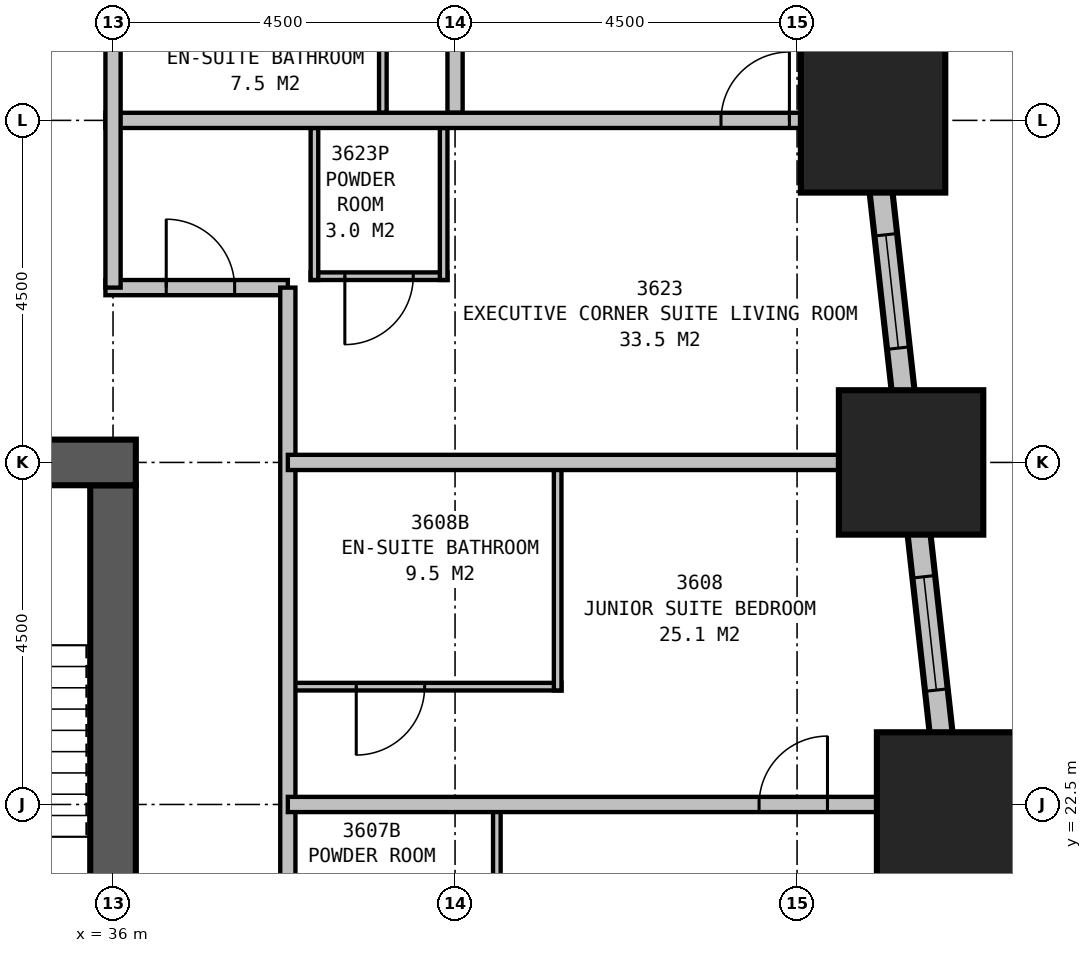
"""IFC4 building model, lengths in metres.
Left out: names, types, materials, properties, quantities, classifications, styles, units other than length and angle.
Written with IfcOpenShell. Run it as: python <this file> out.ifc"""

import sys

from ifc_helpers import new_model, si_unit, direction, frame, frame_2d, origin, origin_2d, place, context, subcontext, project, spatial, rectangle, extrude, element, fill, save


model = new_model("IFC4")
c1 = context("Model", 3, precision=1e-05, world=origin(), true_north=direction((0.0, 1.0)))
c2 = subcontext(c1, "Body", "Model", "MODEL_VIEW")
j1 = project(units=[si_unit("LENGTHUNIT", "METRE"), si_unit("PLANEANGLEUNIT", "RADIAN")], contexts=[c1])
p1 = place(None, origin())
s1 = spatial("IfcSite", under=j1, at=p1, CompositionType="ELEMENT")
p2 = place(p1, origin())
s2 = spatial("IfcBuilding", under=s1, at=p2, CompositionType="ELEMENT")
p3 = place(p2, frame((0.0, 0.0, 138.9)))
s3 = spatial("IfcBuildingStorey", under=s2, at=p3, CompositionType="ELEMENT", Elevation=138.9)
for number, where, z_axis, x_axis in (
    (1, (47.0, 22.5, 0.0), (0.0, 0.0, 1.0), (1.0, 0.0, 0.0)),
    (2, (46.5, 27.0, 0.0), (0.0, 0.0, 1.0), (1.0, 0.0, 0.0)),
    (3, (46.0, 31.5, 0.0), (0.0, 0.0, 1.0), (1.0, 0.0, 0.0)),
):
    element("IfcColumn", number, at=place(p3, frame(where, z_axis=z_axis, x_axis=x_axis)), inside=s3, PredefinedType="COLUMN", context=c2, shape_type="SweptSolid", body=[
        extrude(rectangle(XDim=1.9, YDim=1.9, at=origin_2d()), origin(), (0.0, 0.0, 1.0), 3.5),
    ])
p4 = place(p3, frame((36.3, 27.0, 0.0), z_axis=(0.0, 0.0, 1.0), x_axis=(-1.0, 0.0, 0.0)))
e4 = element("IfcWall", 4, at=p4, inside=s3, PredefinedType="SHEAR", context=c2, shape_type="SweptSolid", body=[
    extrude(rectangle(XDim=23.1, YDim=0.6, at=frame_2d((11.55, 0.0))), origin(), (0.0, 0.0, 1.0), 3.5),
])
p5 = place(p4, frame((17.05, 0.0, 0.0)))
e5 = element("IfcOpeningElement", 5, at=p5, cuts=e4, PredefinedType="OPENING", context=c2, shape_type="SweptSolid", body=[
    extrude(rectangle(XDim=1.0, YDim=2.1, at=frame_2d((0.5, 1.05))), frame((0.0, 0.31, 0.0), z_axis=(0.0, -1.0, 0.0), x_axis=(1.0, 0.0, 0.0)), (0.0, 0.0, 1.0), 0.62),
])
p6 = place(p4, frame((12.05, 0.0, 0.0)))
e6 = element("IfcOpeningElement", 6, at=p6, cuts=e4, PredefinedType="OPENING", context=c2, shape_type="SweptSolid", body=[
    extrude(rectangle(XDim=1.0, YDim=2.1, at=frame_2d((0.5, 1.05))), frame((0.0, 0.31, 0.0), z_axis=(0.0, -1.0, 0.0), x_axis=(1.0, 0.0, 0.0)), (0.0, 0.0, 1.0), 0.62),
])
p7 = place(p4, frame((7.05, 0.0, 0.0)))
e7 = element("IfcOpeningElement", 7, at=p7, cuts=e4, PredefinedType="OPENING", context=c2, shape_type="SweptSolid", body=[
    extrude(rectangle(XDim=1.0, YDim=2.1, at=frame_2d((0.5, 1.05))), frame((0.0, 0.31, 0.0), z_axis=(0.0, -1.0, 0.0), x_axis=(1.0, 0.0, 0.0)), (0.0, 0.0, 1.0), 0.62),
])
p8 = place(p3, frame((36.0, 20.0, 0.0), z_axis=(0.0, 0.0, 1.0), x_axis=(0.0, 1.0, 0.0)))
e8 = element("IfcWall", 8, at=p8, inside=s3, PredefinedType="SHEAR", context=c2, shape_type="SweptSolid", body=[
    extrude(rectangle(XDim=6.7, YDim=0.6, at=frame_2d((3.35, 0.0))), origin(), (0.0, 0.0, 1.0), 3.5),
])
p9 = place(p3, frame((49.017, 4.351, 0.0), z_axis=(0.0, 0.0, 1.0), x_axis=(-0.110433201132, 0.993883548555, 0.0)))
e9 = element("IfcWall", 9, at=p9, inside=s3, PredefinedType="STANDARD", context=c2, shape_type="SweptSolid", body=[
    extrude(rectangle(XDim=31.994, YDim=0.3, at=frame_2d((15.997, 0.0))), origin(), (0.0, 0.0, 1.0), 2.15),
])
p10 = place(p9, frame((1.664, 0.0, 0.5)))
e10 = element("IfcOpeningElement", 10, at=p10, cuts=e9, PredefinedType="OPENING", context=c2, shape_type="SweptSolid", body=[
    extrude(rectangle(XDim=1.5, YDim=1.5, at=frame_2d((0.75, 0.75))), frame((0.0, 0.16, 0.0), z_axis=(0.0, -1.0, 0.0), x_axis=(1.0, 0.0, 0.0)), (0.0, 0.0, 1.0), 0.32),
])
p11 = place(p9, frame((6.192, 0.0, 0.5)))
e11 = element("IfcOpeningElement", 11, at=p11, cuts=e9, PredefinedType="OPENING", context=c2, shape_type="SweptSolid", body=[
    extrude(rectangle(XDim=1.5, YDim=1.5, at=frame_2d((0.75, 0.75))), frame((0.0, 0.16, 0.0), z_axis=(0.0, -1.0, 0.0), x_axis=(1.0, 0.0, 0.0)), (0.0, 0.0, 1.0), 0.32),
])
p12 = place(p9, frame((10.719, 0.0, 0.5)))
e12 = element("IfcOpeningElement", 12, at=p12, cuts=e9, PredefinedType="OPENING", context=c2, shape_type="SweptSolid", body=[
    extrude(rectangle(XDim=1.5, YDim=1.5, at=frame_2d((0.75, 0.75))), frame((0.0, 0.16, 0.0), z_axis=(0.0, -1.0, 0.0), x_axis=(1.0, 0.0, 0.0)), (0.0, 0.0, 1.0), 0.32),
])
p13 = place(p9, frame((15.247, 0.0, 0.5)))
e13 = element("IfcOpeningElement", 13, at=p13, cuts=e9, PredefinedType="OPENING", context=c2, shape_type="SweptSolid", body=[
    extrude(rectangle(XDim=1.5, YDim=1.5, at=frame_2d((0.75, 0.75))), frame((0.0, 0.16, 0.0), z_axis=(0.0, -1.0, 0.0), x_axis=(1.0, 0.0, 0.0)), (0.0, 0.0, 1.0), 0.32),
])
p14 = place(p9, frame((19.775, 0.0, 0.5)))
e14 = element("IfcOpeningElement", 14, at=p14, cuts=e9, PredefinedType="OPENING", context=c2, shape_type="SweptSolid", body=[
    extrude(rectangle(XDim=1.5, YDim=1.5, at=frame_2d((0.75, 0.75))), frame((0.0, 0.16, 0.0), z_axis=(0.0, -1.0, 0.0), x_axis=(1.0, 0.0, 0.0)), (0.0, 0.0, 1.0), 0.32),
])
p15 = place(p9, frame((24.302, 0.0, 0.5)))
e15 = element("IfcOpeningElement", 15, at=p15, cuts=e9, PredefinedType="OPENING", context=c2, shape_type="SweptSolid", body=[
    extrude(rectangle(XDim=1.5, YDim=1.5, at=frame_2d((0.75, 0.75))), frame((0.0, 0.16, 0.0), z_axis=(0.0, -1.0, 0.0), x_axis=(1.0, 0.0, 0.0)), (0.0, 0.0, 1.0), 0.32),
])
p16 = place(p9, frame((28.83, 0.0, 0.5)))
e16 = element("IfcOpeningElement", 16, at=p16, cuts=e9, PredefinedType="OPENING", context=c2, shape_type="SweptSolid", body=[
    extrude(rectangle(XDim=1.5, YDim=1.5, at=frame_2d((0.75, 0.75))), frame((0.0, 0.16, 0.0), z_axis=(0.0, -1.0, 0.0), x_axis=(1.0, 0.0, 0.0)), (0.0, 0.0, 1.0), 0.32),
])
p17 = place(p3, frame((35.9, 29.3, 0.0), z_axis=(0.0, 0.0, 1.0), x_axis=(1.0, 0.0, 0.0)))
e17 = element("IfcWall", 17, at=p17, inside=s3, PredefinedType="PARTITIONING", context=c2, shape_type="SweptSolid", body=[
    extrude(rectangle(XDim=2.4, YDim=0.2, at=frame_2d((1.2, 0.0))), origin(), (0.0, 0.0, 1.0), 3.25),
])
p18 = place(p17, frame((0.8, 0.0, 0.0)))
e18 = element("IfcOpeningElement", 18, at=p18, cuts=e17, PredefinedType="OPENING", context=c2, shape_type="SweptSolid", body=[
    extrude(rectangle(XDim=0.9, YDim=2.1, at=frame_2d((0.45, 1.05))), frame((0.0, 0.11, 0.0), z_axis=(0.0, -1.0, 0.0), x_axis=(1.0, 0.0, 0.0)), (0.0, 0.0, 1.0), 0.22),
])
p19 = place(p3, frame((38.3, 11.2, 0.0), z_axis=(0.0, 0.0, 1.0), x_axis=(0.0, 1.0, 0.0)))
e19 = element("IfcWall", 19, at=p19, inside=s3, PredefinedType="PARTITIONING", context=c2, shape_type="SweptSolid", body=[
    extrude(rectangle(XDim=18.1, YDim=0.2, at=frame_2d((9.05, 0.0))), origin(), (0.0, 0.0, 1.0), 3.25),
])
p20 = place(p19, frame((5.0, 0.0, 0.0), z_axis=(0.0, 0.0, 1.0), x_axis=(-1.0, 0.0, 0.0)))
e20 = element("IfcOpeningElement", 20, at=p20, cuts=e19, PredefinedType="OPENING", context=c2, shape_type="SweptSolid", body=[
    extrude(rectangle(XDim=1.0, YDim=2.1, at=frame_2d((0.5, 1.05))), frame((0.0, 0.11, 0.0), z_axis=(0.0, -1.0, 0.0), x_axis=(1.0, 0.0, 0.0)), (0.0, 0.0, 1.0), 0.22),
])
p21 = place(p19, frame((8.55, 0.0, 0.0), z_axis=(0.0, 0.0, 1.0), x_axis=(-1.0, 0.0, 0.0)))
e21 = element("IfcOpeningElement", 21, at=p21, cuts=e19, PredefinedType="OPENING", context=c2, shape_type="SweptSolid", body=[
    extrude(rectangle(XDim=0.9, YDim=2.1, at=frame_2d((0.45, 1.05))), frame((0.0, 0.11, 0.0), z_axis=(0.0, -1.0, 0.0), x_axis=(1.0, 0.0, 0.0)), (0.0, 0.0, 1.0), 0.22),
])
p22 = place(p3, frame((38.3, 22.5, 0.0), z_axis=(0.0, 0.0, 1.0), x_axis=(1.0, 0.0, 0.0)))
e22 = element("IfcWall", 22, at=p22, inside=s3, PredefinedType="PARTITIONING", context=c2, shape_type="SweptSolid", body=[
    extrude(rectangle(XDim=8.699, YDim=0.2, at=frame_2d((4.35, 0.0))), origin(), (0.0, 0.0, 1.0), 2.25),
])
p23 = place(p22, frame((6.2, 0.0, 0.0)))
e23 = element("IfcOpeningElement", 23, at=p23, cuts=e22, PredefinedType="OPENING", context=c2, shape_type="SweptSolid", body=[
    extrude(rectangle(XDim=0.9, YDim=2.1, at=frame_2d((0.45, 1.05))), frame((0.0, 0.11, 0.0), z_axis=(0.0, -1.0, 0.0), x_axis=(1.0, 0.0, 0.0)), (0.0, 0.0, 1.0), 0.22),
])
p24 = place(p3, frame((41.05, 20.1, 0.0), z_axis=(0.0, 0.0, 1.0), x_axis=(0.0, 1.0, 0.0)))
e24 = element("IfcWall", 24, at=p24, inside=s3, PredefinedType="PLUMBINGWALL", context=c2, shape_type="SweptSolid", body=[
    extrude(rectangle(XDim=2.4, YDim=0.1, at=frame_2d((1.2, 0.0))), origin(), (0.0, 0.0, 1.0), 3.25),
])
p25 = place(p3, frame((41.85, 24.0, 0.0), z_axis=(0.0, 0.0, 1.0), x_axis=(0.0, 1.0, 0.0)))
e25 = element("IfcWall", 25, at=p25, inside=s3, PredefinedType="PLUMBINGWALL", context=c2, shape_type="SweptSolid", body=[
    extrude(rectangle(XDim=3.0, YDim=0.1, at=frame_2d((1.5, 0.0))), origin(), (0.0, 0.0, 1.0), 3.25),
])
p26 = place(p3, frame((38.3, 24.05, 0.0), z_axis=(0.0, 0.0, 1.0), x_axis=(1.0, 0.0, 0.0)))
e26 = element("IfcWall", 26, at=p26, inside=s3, PredefinedType="PLUMBINGWALL", context=c2, shape_type="SweptSolid", body=[
    extrude(rectangle(XDim=3.6, YDim=0.1, at=frame_2d((1.8, 0.0))), origin(), (0.0, 0.0, 1.0), 3.25),
])
p27 = place(p26, frame((1.8, 0.0, 0.0), z_axis=(0.0, 0.0, 1.0), x_axis=(-1.0, 0.0, 0.0)))
e27 = element("IfcOpeningElement", 27, at=p27, cuts=e26, PredefinedType="OPENING", context=c2, shape_type="SweptSolid", body=[
    extrude(rectangle(XDim=0.9, YDim=2.1, at=frame_2d((0.45, 1.05))), frame((0.0, 0.06, 0.0), z_axis=(0.0, -1.0, 0.0), x_axis=(1.0, 0.0, 0.0)), (0.0, 0.0, 1.0), 0.12),
])
p28 = place(p3, frame((38.3, 27.0, 0.0), z_axis=(0.0, 0.0, 1.0), x_axis=(1.0, 0.0, 0.0)))
e28 = element("IfcWall", 28, at=p28, inside=s3, PredefinedType="PARTITIONING", context=c2, shape_type="SweptSolid", body=[
    extrude(rectangle(XDim=7.977, YDim=0.2, at=frame_2d((3.988, 0.0))), origin(), (0.0, 0.0, 1.0), 1.95),
])
p29 = place(p3, frame((36.0, 29.3, 0.0), z_axis=(0.0, 0.0, 1.0), x_axis=(0.0, 1.0, 0.0)))
e29 = element("IfcWall", 29, at=p29, inside=s3, PredefinedType="PARTITIONING", context=c2, shape_type="SweptSolid", body=[
    extrude(rectangle(XDim=11.2, YDim=0.2, at=frame_2d((5.6, 0.0))), origin(), (0.0, 0.0, 1.0), 2.25),
])
p30 = place(p3, frame((35.9, 31.5, 0.0), z_axis=(0.0, 0.0, 1.0), x_axis=(1.0, 0.0, 0.0)))
e30 = element("IfcWall", 30, at=p30, inside=s3, PredefinedType="PARTITIONING", context=c2, shape_type="SweptSolid", body=[
    extrude(rectangle(XDim=10.099, YDim=0.2, at=frame_2d((5.05, 0.0))), origin(), (0.0, 0.0, 1.0), 3.25),
])
p31 = place(p30, frame((8.099, 0.0, 0.0)))
e31 = element("IfcOpeningElement", 31, at=p31, cuts=e30, PredefinedType="OPENING", context=c2, shape_type="SweptSolid", body=[
    extrude(rectangle(XDim=0.9, YDim=2.1, at=frame_2d((0.45, 1.05))), frame((0.0, 0.11, 0.0), z_axis=(0.0, -1.0, 0.0), x_axis=(1.0, 0.0, 0.0)), (0.0, 0.0, 1.0), 0.22),
])
p32 = place(p3, frame((40.35, 31.4, 0.0), z_axis=(0.0, 0.0, 1.0), x_axis=(0.0, -1.0, 0.0)))
e32 = element("IfcWall", 32, at=p32, inside=s3, PredefinedType="PLUMBINGWALL", context=c2, shape_type="SweptSolid", body=[
    extrude(rectangle(XDim=2.0, YDim=0.1, at=frame_2d((1.0, 0.0))), origin(), (0.0, 0.0, 1.0), 2.25),
])
p33 = place(p3, frame((38.65, 31.4, 0.0), z_axis=(0.0, 0.0, 1.0), x_axis=(0.0, -1.0, 0.0)))
e33 = element("IfcWall", 33, at=p33, inside=s3, PredefinedType="PLUMBINGWALL", context=c2, shape_type="SweptSolid", body=[
    extrude(rectangle(XDim=2.0, YDim=0.1, at=frame_2d((1.0, 0.0))), origin(), (0.0, 0.0, 1.0), 3.25),
])
p34 = place(p3, frame((38.6, 29.45, 0.0), z_axis=(0.0, 0.0, 1.0), x_axis=(1.0, 0.0, 0.0)))
e34 = element("IfcWall", 34, at=p34, inside=s3, PredefinedType="PLUMBINGWALL", context=c2, shape_type="SweptSolid", body=[
    extrude(rectangle(XDim=1.8, YDim=0.1, at=frame_2d((0.9, 0.0))), origin(), (0.0, 0.0, 1.0), 3.25),
])
p35 = place(p34, frame((1.35, 0.0, 0.0), z_axis=(0.0, 0.0, 1.0), x_axis=(-1.0, 0.0, 0.0)))
e35 = element("IfcOpeningElement", 35, at=p35, cuts=e34, PredefinedType="OPENING", context=c2, shape_type="SweptSolid", body=[
    extrude(rectangle(XDim=0.9, YDim=2.1, at=frame_2d((0.45, 1.05))), frame((0.0, 0.06, 0.0), z_axis=(0.0, -1.0, 0.0), x_axis=(1.0, 0.0, 0.0)), (0.0, 0.0, 1.0), 0.12),
])
p36 = place(p3, frame((40.5, 31.6, 0.0), z_axis=(0.0, 0.0, 1.0), x_axis=(0.0, 1.0, 0.0)))
e36 = element("IfcWall", 36, at=p36, inside=s3, PredefinedType="PARTITIONING", context=c2, shape_type="SweptSolid", body=[
    extrude(rectangle(XDim=4.4, YDim=0.2, at=frame_2d((2.2, 0.0))), origin(), (0.0, 0.0, 1.0), 2.25),
])
p37 = place(p36, frame((2.4, 0.0, 0.0)))
e37 = element("IfcOpeningElement", 37, at=p37, cuts=e36, PredefinedType="OPENING", context=c2, shape_type="SweptSolid", body=[
    extrude(rectangle(XDim=0.9, YDim=2.1, at=frame_2d((0.45, 1.05))), frame((0.0, 0.11, 0.0), z_axis=(0.0, -1.0, 0.0), x_axis=(1.0, 0.0, 0.0)), (0.0, 0.0, 1.0), 0.22),
])
p38 = place(p3, frame((39.55, 31.6, 0.0), z_axis=(0.0, 0.0, 1.0), x_axis=(0.0, 1.0, 0.0)))
e38 = element("IfcWall", 38, at=p38, inside=s3, PredefinedType="PLUMBINGWALL", context=c2, shape_type="SweptSolid", body=[
    extrude(rectangle(XDim=2.3, YDim=0.1, at=frame_2d((1.15, 0.0))), origin(), (0.0, 0.0, 1.0), 3.25),
])
p39 = place(p14, origin())
e39 = element("IfcWindow", 39, at=p39, inside=s3, PartitioningType="SINGLE_PANEL", PredefinedType="WINDOW", context=c2, shape_type="SweptSolid", body=[
    extrude(rectangle(XDim=1.5, YDim=1.5, at=frame_2d((0.75, 0.75))), frame((0.0, 0.03, 0.0), z_axis=(0.0, -1.0, 0.0), x_axis=(1.0, 0.0, 0.0)), (0.0, 0.0, 1.0), 0.06),
])
fill(e14, e39)
p40 = place(p15, origin())
e40 = element("IfcWindow", 40, at=p40, inside=s3, PartitioningType="SINGLE_PANEL", PredefinedType="WINDOW", context=c2, shape_type="SweptSolid", body=[
    extrude(rectangle(XDim=1.5, YDim=1.5, at=frame_2d((0.75, 0.75))), frame((0.0, 0.03, 0.0), z_axis=(0.0, -1.0, 0.0), x_axis=(1.0, 0.0, 0.0)), (0.0, 0.0, 1.0), 0.06),
])
fill(e15, e40)
p41 = place(p18, origin())
e41 = element("IfcDoor", 41, at=p41, inside=s3, OperationType="SINGLE_SWING_LEFT", PredefinedType="DOOR", context=c2, shape_type="SweptSolid", body=[
    extrude(rectangle(XDim=0.9, YDim=2.1, at=frame_2d((0.45, 1.05))), frame((0.0, 0.025, 0.0), z_axis=(0.0, -1.0, 0.0), x_axis=(1.0, 0.0, 0.0)), (0.0, 0.0, 1.0), 0.05),
])
fill(e18, e41)
p42 = place(p23, origin())
e42 = element("IfcDoor", 42, at=p42, inside=s3, OperationType="SINGLE_SWING_RIGHT", PredefinedType="DOOR", context=c2, shape_type="SweptSolid", body=[
    extrude(rectangle(XDim=0.9, YDim=2.1, at=frame_2d((0.45, 1.05))), frame((0.0, 0.025, 0.0), z_axis=(0.0, -1.0, 0.0), x_axis=(1.0, 0.0, 0.0)), (0.0, 0.0, 1.0), 0.05),
])
fill(e23, e42)
p43 = place(p27, origin())
e43 = element("IfcDoor", 43, at=p43, inside=s3, OperationType="SINGLE_SWING_RIGHT", PredefinedType="DOOR", context=c2, shape_type="SweptSolid", body=[
    extrude(rectangle(XDim=0.9, YDim=2.1, at=frame_2d((0.45, 1.05))), frame((0.0, 0.025, 0.0), z_axis=(0.0, -1.0, 0.0), x_axis=(1.0, 0.0, 0.0)), (0.0, 0.0, 1.0), 0.05),
])
fill(e27, e43)
p44 = place(p31, origin())
e44 = element("IfcDoor", 44, at=p44, inside=s3, OperationType="SINGLE_SWING_RIGHT", PredefinedType="DOOR", context=c2, shape_type="SweptSolid", body=[
    extrude(rectangle(XDim=0.9, YDim=2.1, at=frame_2d((0.45, 1.05))), frame((0.0, 0.025, 0.0), z_axis=(0.0, -1.0, 0.0), x_axis=(1.0, 0.0, 0.0)), (0.0, 0.0, 1.0), 0.05),
])
fill(e31, e44)
p45 = place(p35, origin())
e45 = element("IfcDoor", 45, at=p45, inside=s3, OperationType="SINGLE_SWING_RIGHT", PredefinedType="DOOR", context=c2, shape_type="SweptSolid", body=[
    extrude(rectangle(XDim=0.9, YDim=2.1, at=frame_2d((0.45, 1.05))), frame((0.0, 0.025, 0.0), z_axis=(0.0, -1.0, 0.0), x_axis=(1.0, 0.0, 0.0)), (0.0, 0.0, 1.0), 0.05),
])
fill(e35, e45)
save(model, sys.argv[1])
